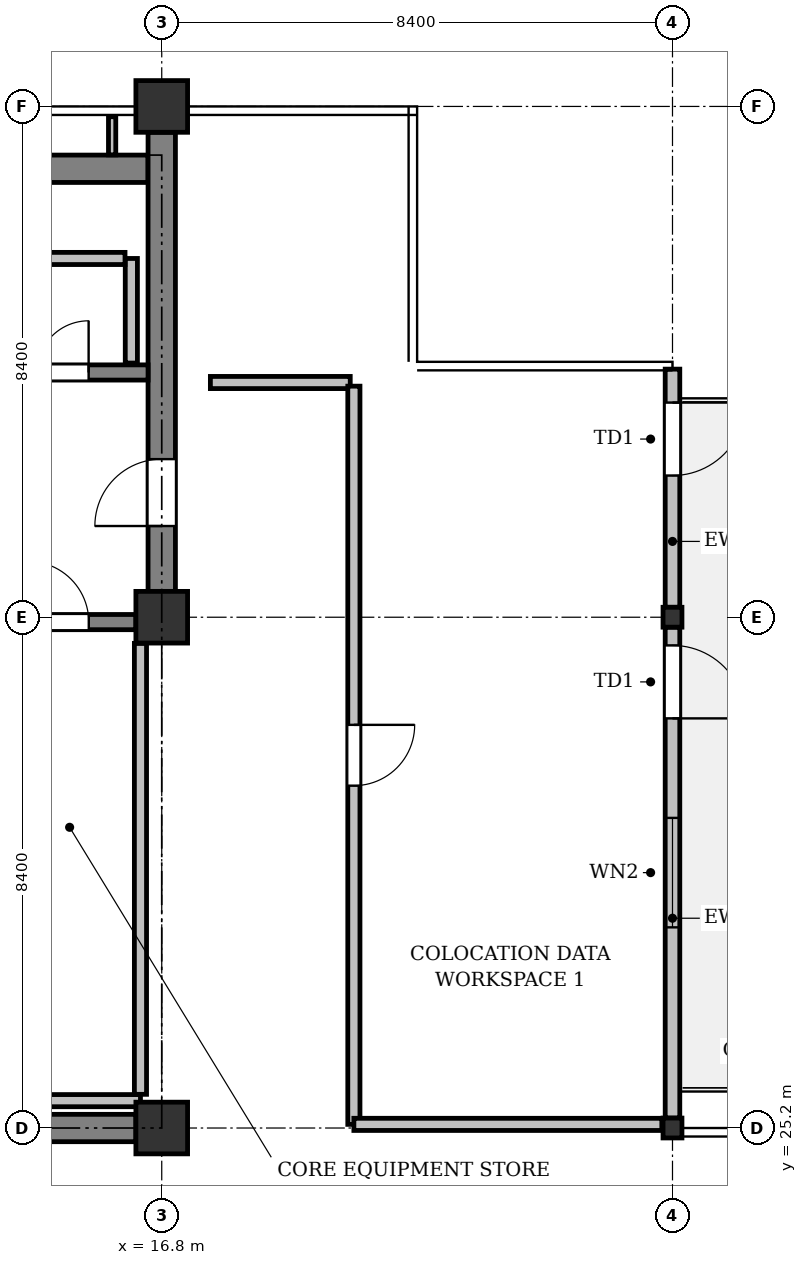
"""IFC4 building model, lengths in metres.
Left out: names, types, materials, properties, quantities, classifications, styles, units other than length and angle.
Written with IfcOpenShell. Run it as: python <this file> out.ifc"""

import sys

from ifc_helpers import new_model, si_unit, direction, frame, frame_2d, origin, origin_2d, place, context, subcontext, project, spatial, rectangle, i_section, extrude, element, fill, save


model = new_model("IFC4")
c1 = context("Model", 3, precision=1e-05, world=origin(), true_north=direction((0.0, 1.0)))
c2 = subcontext(c1, "Body", "Model", "MODEL_VIEW")
j1 = project(units=[si_unit("LENGTHUNIT", "METRE"), si_unit("PLANEANGLEUNIT", "RADIAN")], contexts=[c1])
p1 = place(None, origin())
s1 = spatial("IfcSite", under=j1, at=p1, CompositionType="ELEMENT")
p2 = place(p1, origin())
s2 = spatial("IfcBuilding", under=s1, at=p2, CompositionType="ELEMENT")
p3 = place(p2, frame((0.0, 0.0, 274.2)))
s3 = spatial("IfcBuildingStorey", under=s2, at=p3, CompositionType="ELEMENT", Elevation=274.2)
for number, where, z_axis, x_axis in (
    (1, (16.8, 25.2, 0.0), (0.0, 0.0, 1.0), (1.0, 0.0, 0.0)),
    (2, (16.8, 33.6, 0.0), (0.0, 0.0, 1.0), (1.0, 0.0, 0.0)),
    (3, (16.8, 42.0, 0.0), (0.0, 0.0, 1.0), (1.0, 0.0, 0.0)),
):
    element("IfcColumn", number, at=place(p3, frame(where, z_axis=z_axis, x_axis=x_axis)), inside=s3, PredefinedType="COLUMN", context=c2, shape_type="SweptSolid", body=[
        extrude(rectangle(XDim=0.85, YDim=0.85, at=origin_2d()), origin(), (0.0, 0.0, 1.0), 4.0),
    ])
for number, where, z_axis, x_axis in (
    (4, (25.2, 25.2, 0.0), (0.0, 0.0, 1.0), (1.0, 0.0, 0.0)),
    (5, (25.2, 33.6, 0.0), (0.0, 0.0, 1.0), (1.0, 0.0, 0.0)),
):
    element("IfcColumn", number, at=place(p3, frame(where, z_axis=z_axis, x_axis=x_axis)), inside=s3, PredefinedType="COLUMN", context=c2, shape_type="SweptSolid", body=[
        extrude(i_section(OverallWidth=0.311, OverallDepth=0.327, WebThickness=0.016, FlangeThickness=0.025, FilletRadius=0.017, at=origin_2d()), origin(), (0.0, 0.0, 1.0), 4.0),
    ])
p4 = place(p3, frame((25.2, 37.68, 0.0), z_axis=(0.0, 0.0, 1.0), x_axis=(0.0, -1.0, 0.0)))
e6 = element("IfcWall", 6, at=p4, inside=s3, PredefinedType="STANDARD", context=c2, shape_type="SweptSolid", body=[
    extrude(rectangle(XDim=3.917, YDim=0.24, at=frame_2d((1.958, 0.0))), origin(), (0.0, 0.0, 1.0), 3.725),
])
p5 = place(p4, frame((0.55, 0.0, 0.0)))
e7 = element("IfcOpeningElement", 7, at=p5, cuts=e6, PredefinedType="OPENING", context=c2, shape_type="SweptSolid", body=[
    extrude(rectangle(XDim=1.2, YDim=2.2, at=frame_2d((0.6, 1.1))), frame((0.0, 0.13, 0.0), z_axis=(0.0, -1.0, 0.0), x_axis=(1.0, 0.0, 0.0)), (0.0, 0.0, 1.0), 0.26),
])
p6 = place(p3, frame((25.2, 33.437, 0.0), z_axis=(0.0, 0.0, 1.0), x_axis=(0.0, -1.0, 0.0)))
e8 = element("IfcWall", 8, at=p6, inside=s3, PredefinedType="STANDARD", context=c2, shape_type="SweptSolid", body=[
    extrude(rectangle(XDim=8.073, YDim=0.24, at=frame_2d((4.037, 0.0))), origin(), (0.0, 0.0, 1.0), 3.475),
])
p7 = place(p6, frame((0.3, 0.0, 0.0)))
e9 = element("IfcOpeningElement", 9, at=p7, cuts=e8, PredefinedType="OPENING", context=c2, shape_type="SweptSolid", body=[
    extrude(rectangle(XDim=1.2, YDim=2.2, at=frame_2d((0.6, 1.1))), frame((0.0, 0.13, 0.0), z_axis=(0.0, -1.0, 0.0), x_axis=(1.0, 0.0, 0.0)), (0.0, 0.0, 1.0), 0.26),
])
p8 = place(p6, frame((3.136, 0.0, 0.9)))
e10 = element("IfcOpeningElement", 10, at=p8, cuts=e8, PredefinedType="OPENING", context=c2, shape_type="SweptSolid", body=[
    extrude(rectangle(XDim=1.8, YDim=1.6, at=frame_2d((0.9, 0.8))), frame((0.0, 0.13, 0.0), z_axis=(0.0, -1.0, 0.0), x_axis=(1.0, 0.0, 0.0)), (0.0, 0.0, 1.0), 0.26),
])
p9 = place(p3, frame((8.625, 40.975, 0.0), z_axis=(0.0, 0.0, 1.0), x_axis=(1.0, 0.0, 0.0)))
e11 = element("IfcWall", 11, at=p9, inside=s3, PredefinedType="SHEAR", context=c2, shape_type="SweptSolid", body=[
    extrude(rectangle(XDim=7.95, YDim=0.45, at=frame_2d((3.975, 0.0))), origin(), (0.0, 0.0, 1.0), 3.725),
])
p10 = place(p3, frame((16.8, 34.025, 0.0), z_axis=(0.0, 0.0, 1.0), x_axis=(0.0, 1.0, 0.0)))
e12 = element("IfcWall", 12, at=p10, inside=s3, PredefinedType="SHEAR", context=c2, shape_type="SweptSolid", body=[
    extrude(rectangle(XDim=7.55, YDim=0.45, at=frame_2d((3.775, 0.0))), origin(), (0.0, 0.0, 1.0), 3.725),
])
p11 = place(p10, frame((1.075, 0.0, 0.0)))
e13 = element("IfcOpeningElement", 13, at=p11, cuts=e12, PredefinedType="OPENING", context=c2, shape_type="SweptSolid", body=[
    extrude(rectangle(XDim=1.1, YDim=2.15, at=frame_2d((0.55, 1.075))), frame((0.0, 0.235, 0.0), z_axis=(0.0, -1.0, 0.0), x_axis=(1.0, 0.0, 0.0)), (0.0, 0.0, 1.0), 0.47),
])
p12 = place(p3, frame((8.825, 25.2, 0.0), z_axis=(0.0, 0.0, 1.0), x_axis=(1.0, 0.0, 0.0)))
e14 = element("IfcWall", 14, at=p12, inside=s3, PredefinedType="SHEAR", context=c2, shape_type="SweptSolid", body=[
    extrude(rectangle(XDim=7.55, YDim=0.45, at=frame_2d((3.775, 0.0))), origin(), (0.0, 0.0, 1.0), 3.725),
])
p13 = place(p12, frame((3.875, 0.0, 0.0)))
e15 = element("IfcOpeningElement", 15, at=p13, cuts=e14, PredefinedType="OPENING", context=c2, shape_type="SweptSolid", body=[
    extrude(rectangle(XDim=1.1, YDim=2.15, at=frame_2d((0.55, 1.075))), frame((0.0, 0.235, 0.0), z_axis=(0.0, -1.0, 0.0), x_axis=(1.0, 0.0, 0.0)), (0.0, 0.0, 1.0), 0.47),
])
p14 = place(p3, frame((12.45, 33.52, 0.0), z_axis=(0.0, 0.0, 1.0), x_axis=(1.0, 0.0, 0.0)))
e16 = element("IfcWall", 16, at=p14, inside=s3, PredefinedType="SHEAR", context=c2, shape_type="SweptSolid", body=[
    extrude(rectangle(XDim=3.925, YDim=0.25, at=frame_2d((1.962, 0.0))), origin(), (0.0, 0.0, 1.0), 3.725),
])
p15 = place(p14, frame((2.15, 0.0, 0.0)))
e17 = element("IfcOpeningElement", 17, at=p15, cuts=e16, PredefinedType="OPENING", context=c2, shape_type="SweptSolid", body=[
    extrude(rectangle(XDim=1.0, YDim=2.15, at=frame_2d((0.5, 1.075))), frame((0.0, 0.135, 0.0), z_axis=(0.0, -1.0, 0.0), x_axis=(1.0, 0.0, 0.0)), (0.0, 0.0, 1.0), 0.27),
])
p16 = place(p3, frame((12.45, 37.625, 0.0), z_axis=(0.0, 0.0, 1.0), x_axis=(1.0, 0.0, 0.0)))
e18 = element("IfcWall", 18, at=p16, inside=s3, PredefinedType="SHEAR", context=c2, shape_type="SweptSolid", body=[
    extrude(rectangle(XDim=4.125, YDim=0.25, at=frame_2d((2.062, 0.0))), origin(), (0.0, 0.0, 1.0), 3.725),
])
p17 = place(p16, frame((0.978, 0.0, 0.0)))
e19 = element("IfcOpeningElement", 19, at=p17, cuts=e18, PredefinedType="OPENING", context=c2, shape_type="SweptSolid", body=[
    extrude(rectangle(XDim=0.85, YDim=2.15, at=frame_2d((0.425, 1.075))), frame((0.0, 0.135, 0.0), z_axis=(0.0, -1.0, 0.0), x_axis=(1.0, 0.0, 0.0)), (0.0, 0.0, 1.0), 0.27),
])
p18 = place(p16, frame((2.298, 0.0, 0.0)))
e20 = element("IfcOpeningElement", 20, at=p18, cuts=e18, PredefinedType="OPENING", context=c2, shape_type="SweptSolid", body=[
    extrude(rectangle(XDim=0.85, YDim=2.15, at=frame_2d((0.425, 1.075))), frame((0.0, 0.135, 0.0), z_axis=(0.0, -1.0, 0.0), x_axis=(1.0, 0.0, 0.0)), (0.0, 0.0, 1.0), 0.27),
])
p19 = place(p3, frame((14.12, 25.65, 0.0), z_axis=(0.0, 0.0, 1.0), x_axis=(1.0, 0.0, 0.0)))
e21 = element("IfcWall", 21, at=p19, inside=s3, PredefinedType="PARTITIONING", context=c2, shape_type="SweptSolid", body=[
    extrude(rectangle(XDim=2.33, YDim=0.2, at=frame_2d((1.165, 0.0))), origin(), (0.0, 0.0, 1.0), 3.725),
])
p20 = place(p3, frame((16.45, 25.754, 0.0), z_axis=(0.0, 0.0, 1.0), x_axis=(0.0, 1.0, 0.0)))
e22 = element("IfcWall", 22, at=p20, inside=s3, PredefinedType="PARTITIONING", context=c2, shape_type="SweptSolid", body=[
    extrude(rectangle(XDim=7.416, YDim=0.2, at=frame_2d((3.708, 0.0))), origin(), (0.0, 0.0, 1.0), 3.725),
])
p21 = place(p3, frame((16.3, 37.78, 0.0), z_axis=(0.0, 0.0, 1.0), x_axis=(0.0, 1.0, 0.0)))
e23 = element("IfcWall", 23, at=p21, inside=s3, PredefinedType="PARTITIONING", context=c2, shape_type="SweptSolid", body=[
    extrude(rectangle(XDim=1.72, YDim=0.2, at=frame_2d((0.86, 0.0))), origin(), (0.0, 0.0, 1.0), 2.775),
])
p22 = place(p3, frame((16.196, 39.5, 0.0), z_axis=(0.0, 0.0, 1.0), x_axis=(-1.0, 0.0, 0.0)))
e24 = element("IfcWall", 24, at=p22, inside=s3, PredefinedType="PARTITIONING", context=c2, shape_type="SweptSolid", body=[
    extrude(rectangle(XDim=1.506, YDim=0.2, at=frame_2d((0.753, 0.0))), origin(), (0.0, 0.0, 1.0), 2.775),
])
p23 = place(p3, frame((15.984, 41.204, 0.0), z_axis=(0.0, 0.0, 1.0), x_axis=(0.0, 1.0, 0.0)))
e25 = element("IfcWall", 25, at=p23, inside=s3, PredefinedType="PARTITIONING", context=c2, shape_type="SweptSolid", body=[
    extrude(rectangle(XDim=0.627, YDim=0.12, at=frame_2d((0.313, 0.0))), origin(), (0.0, 0.0, 1.0), 3.725),
])
p24 = place(p3, frame((17.6, 37.46, 0.0), z_axis=(0.0, 0.0, 1.0), x_axis=(1.0, 0.0, 0.0)))
e26 = element("IfcWall", 26, at=p24, inside=s3, PredefinedType="PARTITIONING", context=c2, shape_type="SweptSolid", body=[
    extrude(rectangle(XDim=2.3, YDim=0.2, at=frame_2d((1.15, 0.0))), origin(), (0.0, 0.0, 1.0), 3.725),
])
p25 = place(p3, frame((19.96, 37.4, 0.0), z_axis=(0.0, 0.0, 1.0), x_axis=(0.0, -1.0, 0.0)))
e27 = element("IfcWall", 27, at=p25, inside=s3, PredefinedType="PARTITIONING", context=c2, shape_type="SweptSolid", body=[
    extrude(rectangle(XDim=12.14, YDim=0.2, at=frame_2d((6.07, 0.0))), origin(), (0.0, 0.0, 1.0), 3.271),
])
p26 = place(p25, frame((5.57, 0.0, 0.0)))
e28 = element("IfcOpeningElement", 28, at=p26, cuts=e27, PredefinedType="OPENING", context=c2, shape_type="SweptSolid", body=[
    extrude(rectangle(XDim=1.0, YDim=2.15, at=frame_2d((0.5, 1.075))), frame((0.0, 0.11, 0.0), z_axis=(0.0, -1.0, 0.0), x_axis=(1.0, 0.0, 0.0)), (0.0, 0.0, 1.0), 0.22),
])
p27 = place(p3, frame((19.96, 25.26, 0.0), z_axis=(0.0, 0.0, 1.0), x_axis=(0.999999995352, -9.641342e-05, 0.0)))
e29 = element("IfcWall", 29, at=p27, inside=s3, PredefinedType="PARTITIONING", context=c2, shape_type="SweptSolid", body=[
    extrude(rectangle(XDim=5.064, YDim=0.2, at=frame_2d((2.532, 0.0))), origin(), (0.0, 0.0, 1.0), 3.271),
])
p28 = place(p5, origin())
e30 = element("IfcDoor", 30, at=p28, inside=s3, OperationType="SINGLE_SWING_LEFT", PredefinedType="DOOR", context=c2, shape_type="SweptSolid", body=[
    extrude(rectangle(XDim=1.2, YDim=2.2, at=frame_2d((0.6, 1.1))), frame((0.0, 0.025, 0.0), z_axis=(0.0, -1.0, 0.0), x_axis=(1.0, 0.0, 0.0)), (0.0, 0.0, 1.0), 0.05),
])
fill(e7, e30)
p29 = place(p7, origin())
e31 = element("IfcDoor", 31, at=p29, inside=s3, OperationType="SINGLE_SWING_RIGHT", PredefinedType="DOOR", context=c2, shape_type="SweptSolid", body=[
    extrude(rectangle(XDim=1.2, YDim=2.2, at=frame_2d((0.6, 1.1))), frame((0.0, 0.025, 0.0), z_axis=(0.0, -1.0, 0.0), x_axis=(1.0, 0.0, 0.0)), (0.0, 0.0, 1.0), 0.05),
])
fill(e9, e31)
p30 = place(p8, origin())
e32 = element("IfcWindow", 32, at=p30, inside=s3, PartitioningType="SINGLE_PANEL", PredefinedType="WINDOW", context=c2, shape_type="SweptSolid", body=[
    extrude(rectangle(XDim=1.8, YDim=1.6, at=frame_2d((0.9, 0.8))), frame((0.0, 0.03, 0.0), z_axis=(0.0, -1.0, 0.0), x_axis=(1.0, 0.0, 0.0)), (0.0, 0.0, 1.0), 0.06),
])
fill(e10, e32)
p31 = place(p11, origin())
e33 = element("IfcDoor", 33, at=p31, inside=s3, OperationType="SINGLE_SWING_LEFT", PredefinedType="DOOR", context=c2, shape_type="SweptSolid", body=[
    extrude(rectangle(XDim=1.1, YDim=2.15, at=frame_2d((0.55, 1.075))), frame((0.0, 0.025, 0.0), z_axis=(0.0, -1.0, 0.0), x_axis=(1.0, 0.0, 0.0)), (0.0, 0.0, 1.0), 0.05),
])
fill(e13, e33)
p32 = place(p15, origin())
e34 = element("IfcDoor", 34, at=p32, inside=s3, OperationType="SINGLE_SWING_LEFT", PredefinedType="DOOR", context=c2, shape_type="SweptSolid", body=[
    extrude(rectangle(XDim=1.0, YDim=2.15, at=frame_2d((0.5, 1.075))), frame((0.0, 0.025, 0.0), z_axis=(0.0, -1.0, 0.0), x_axis=(1.0, 0.0, 0.0)), (0.0, 0.0, 1.0), 0.05),
])
fill(e17, e34)
p33 = place(p18, origin())
e35 = element("IfcDoor", 35, at=p33, inside=s3, OperationType="SINGLE_SWING_RIGHT", PredefinedType="DOOR", context=c2, shape_type="SweptSolid", body=[
    extrude(rectangle(XDim=0.85, YDim=2.15, at=frame_2d((0.425, 1.075))), frame((0.0, 0.025, 0.0), z_axis=(0.0, -1.0, 0.0), x_axis=(1.0, 0.0, 0.0)), (0.0, 0.0, 1.0), 0.05),
])
fill(e20, e35)
p34 = place(p26, origin())
e36 = element("IfcDoor", 36, at=p34, inside=s3, OperationType="SINGLE_SWING_LEFT", PredefinedType="DOOR", context=c2, shape_type="SweptSolid", body=[
    extrude(rectangle(XDim=1.0, YDim=2.15, at=frame_2d((0.5, 1.075))), frame((0.0, 0.025, 0.0), z_axis=(0.0, -1.0, 0.0), x_axis=(1.0, 0.0, 0.0)), (0.0, 0.0, 1.0), 0.05),
])
fill(e28, e36)
save(model, sys.argv[1])
